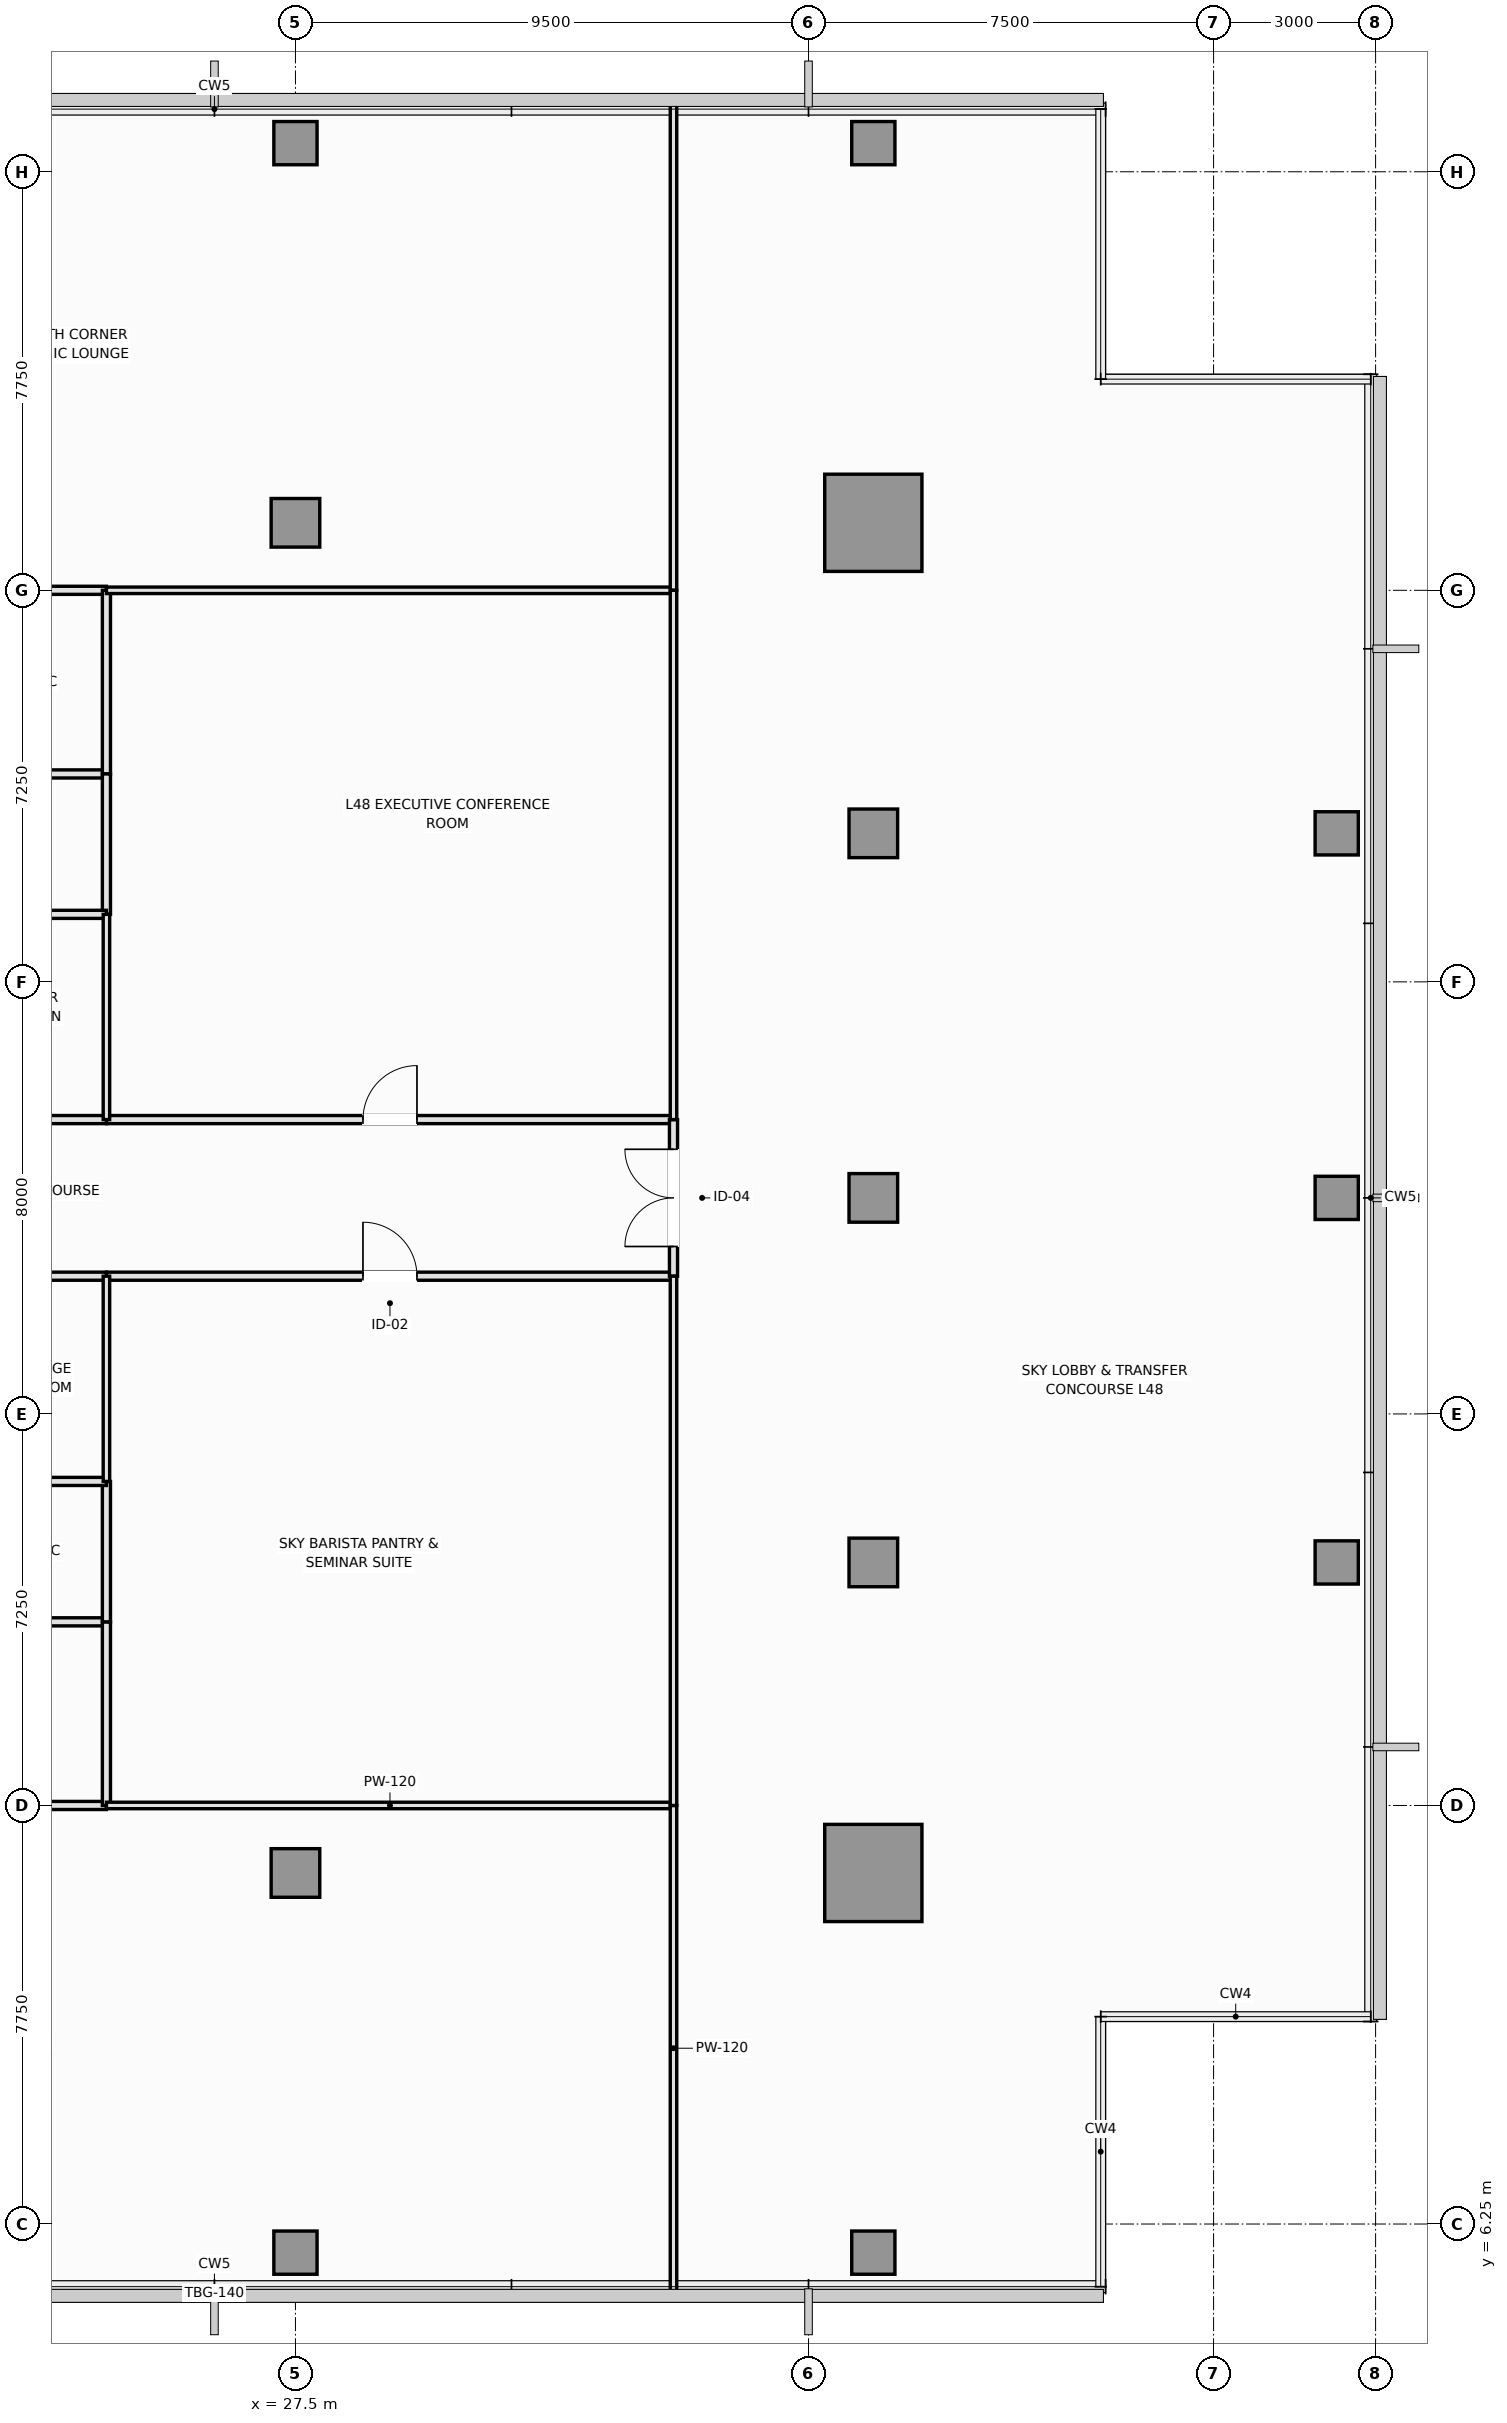
"""IFC4 building model, lengths in metres.
Left out: names, types, materials, properties, quantities, classifications, styles, units other than length and angle.
Written with IfcOpenShell. Run it as: python <this file> out.ifc"""

import sys

from ifc_helpers import new_model, si_unit, direction, frame, frame_2d, origin, origin_2d, place, context, subcontext, project, spatial, rectangle, extrude, element, fill, save


model = new_model("IFC4")
c1 = context("Model", 3, precision=1e-05, world=origin(), true_north=direction((0.0, 1.0)))
c2 = subcontext(c1, "Body", "Model", "MODEL_VIEW")
j1 = project(units=[si_unit("LENGTHUNIT", "METRE"), si_unit("PLANEANGLEUNIT", "RADIAN")], contexts=[c1])
p1 = place(None, origin())
s1 = spatial("IfcSite", under=j1, at=p1, CompositionType="ELEMENT")
p2 = place(p1, origin())
s2 = spatial("IfcBuilding", under=s1, at=p2, CompositionType="ELEMENT")
p3 = place(p2, frame((0.0, 0.0, 183.65)))
s3 = spatial("IfcBuildingStorey", under=s2, at=p3, CompositionType="ELEMENT", Elevation=183.65)
for number, where, z_axis, x_axis in (
    (1, (38.2, 12.75, 0.0), (0.0, 0.0, 1.0), (1.0, 0.0, 0.0)),
    (2, (38.2, 37.75, 0.0), (0.0, 0.0, 1.0), (1.0, 0.0, 0.0)),
):
    element("IfcColumn", number, at=place(p3, frame(where, z_axis=z_axis, x_axis=x_axis)), inside=s3, PredefinedType="COLUMN", context=c2, shape_type="SweptSolid", body=[
        extrude(rectangle(XDim=1.8, YDim=1.8, at=origin_2d()), origin(), (0.0, 0.0, 1.0), 4.4),
    ])
for number, where, z_axis, x_axis in (
    (3, (27.5, 12.75, 0.0), (0.0, 0.0, 1.0), (1.0, 0.0, 0.0)),
    (4, (27.5, 37.75, 0.0), (0.0, 0.0, 1.0), (1.0, 0.0, 0.0)),
    (5, (38.2, 18.5, 0.0), (0.0, 0.0, 1.0), (1.0, 0.0, 0.0)),
    (6, (38.2, 25.25, 0.0), (0.0, 0.0, 1.0), (1.0, 0.0, 0.0)),
    (7, (38.2, 32.0, 0.0), (0.0, 0.0, 1.0), (1.0, 0.0, 0.0)),
):
    element("IfcColumn", number, at=place(p3, frame(where, z_axis=z_axis, x_axis=x_axis)), inside=s3, PredefinedType="COLUMN", context=c2, shape_type="SweptSolid", body=[
        extrude(rectangle(XDim=0.9, YDim=0.9, at=origin_2d()), origin(), (0.0, 0.0, 1.0), 4.4),
    ])
for number, where, z_axis, x_axis in (
    (8, (46.78, 18.5, 0.0), (0.0, 0.0, 1.0), (1.0, 0.0, 0.0)),
    (9, (46.78, 25.25, 0.0), (0.0, 0.0, 1.0), (1.0, 0.0, 0.0)),
    (10, (46.78, 32.0, 0.0), (0.0, 0.0, 1.0), (1.0, 0.0, 0.0)),
    (11, (27.5, 5.72, 0.0), (0.0, 0.0, 1.0), (1.0, 0.0, 0.0)),
    (12, (38.2, 5.72, 0.0), (0.0, 0.0, 1.0), (1.0, 0.0, 0.0)),
    (13, (27.5, 44.78, 0.0), (0.0, 0.0, 1.0), (1.0, 0.0, 0.0)),
    (14, (38.2, 44.78, 0.0), (0.0, 0.0, 1.0), (1.0, 0.0, 0.0)),
):
    element("IfcColumn", number, at=place(p3, frame(where, z_axis=z_axis, x_axis=x_axis)), inside=s3, PredefinedType="COLUMN", context=c2, shape_type="SweptSolid", body=[
        extrude(rectangle(XDim=0.8, YDim=0.8, at=origin_2d()), origin(), (0.0, 0.0, 1.0), 4.4),
    ])
p4 = place(p3, frame((24.0, 23.8, 0.0), z_axis=(0.0, 0.0, 1.0), x_axis=(1.0, 0.0, 0.0)))
e15 = element("IfcWall", 15, at=p4, inside=s3, PredefinedType="PARTITIONING", context=c2, shape_type="SweptSolid", body=[
    extrude(rectangle(XDim=10.5, YDim=0.15, at=frame_2d((5.25, 0.0))), origin(), (0.0, 0.0, 1.0), 4.22),
])
p5 = place(p4, frame((4.75, 0.0, 0.0)))
e16 = element("IfcOpeningElement", 16, at=p5, cuts=e15, PredefinedType="OPENING", context=c2, shape_type="SweptSolid", body=[
    extrude(rectangle(XDim=1.0, YDim=2.15, at=frame_2d((0.5, 1.075))), frame((0.0, 0.085, 0.0), z_axis=(0.0, -1.0, 0.0), x_axis=(1.0, 0.0, 0.0)), (0.0, 0.0, 1.0), 0.17),
])
p6 = place(p3, frame((24.0, 26.7, 0.0), z_axis=(0.0, 0.0, 1.0), x_axis=(1.0, 0.0, 0.0)))
e17 = element("IfcWall", 17, at=p6, inside=s3, PredefinedType="PARTITIONING", context=c2, shape_type="SweptSolid", body=[
    extrude(rectangle(XDim=10.5, YDim=0.15, at=frame_2d((5.25, 0.0))), origin(), (0.0, 0.0, 1.0), 4.22),
])
p7 = place(p6, frame((4.75, 0.0, 0.0)))
e18 = element("IfcOpeningElement", 18, at=p7, cuts=e17, PredefinedType="OPENING", context=c2, shape_type="SweptSolid", body=[
    extrude(rectangle(XDim=1.0, YDim=2.15, at=frame_2d((0.5, 1.075))), frame((0.0, 0.085, 0.0), z_axis=(0.0, -1.0, 0.0), x_axis=(1.0, 0.0, 0.0)), (0.0, 0.0, 1.0), 0.17),
])
p8 = place(p3, frame((34.5, 23.8, 0.0), z_axis=(0.0, 0.0, 1.0), x_axis=(0.0, 1.0, 0.0)))
e19 = element("IfcWall", 19, at=p8, inside=s3, PredefinedType="PARTITIONING", context=c2, shape_type="SweptSolid", body=[
    extrude(rectangle(XDim=2.9, YDim=0.15, at=frame_2d((1.45, 0.0))), origin(), (0.0, 0.0, 1.0), 4.22),
])
p9 = place(p8, frame((0.55, 0.0, 0.0)))
e20 = element("IfcOpeningElement", 20, at=p9, cuts=e19, PredefinedType="OPENING", context=c2, shape_type="SweptSolid", body=[
    extrude(rectangle(XDim=1.8, YDim=2.2, at=frame_2d((0.9, 1.1))), frame((0.0, 0.085, 0.0), z_axis=(0.0, -1.0, 0.0), x_axis=(1.0, 0.0, 0.0)), (0.0, 0.0, 1.0), 0.17),
])
for number, where, z_axis, x_axis in (
    (21, (20.2, 23.8, 0.0), (0.0, 0.0, 1.0), (1.0, 0.0, 0.0)),
    (22, (20.2, 26.7, 0.0), (0.0, 0.0, 1.0), (1.0, 0.0, 0.0)),
):
    element("IfcWall", number, at=place(p3, frame(where, z_axis=z_axis, x_axis=x_axis)), inside=s3, PredefinedType="PARTITIONING", context=c2, shape_type="SweptSolid", body=[
        extrude(rectangle(XDim=3.8, YDim=0.15, at=frame_2d((1.9, 0.0))), origin(), (0.0, 0.0, 1.0), 4.22),
    ])
for number, where, z_axis, x_axis in (
    (23, (20.2, 17.4, 0.0), (0.0, 0.0, 1.0), (1.0, 0.0, 0.0)),
    (24, (20.2, 14.0, 0.0), (0.0, 0.0, 1.0), (1.0, 0.0, 0.0)),
):
    element("IfcWall", number, at=place(p3, frame(where, z_axis=z_axis, x_axis=x_axis)), inside=s3, PredefinedType="PLUMBINGWALL", context=c2, shape_type="SweptSolid", body=[
        extrude(rectangle(XDim=3.8, YDim=0.15, at=frame_2d((1.9, 0.0))), origin(), (0.0, 0.0, 1.0), 4.22),
    ])
p10 = place(p3, frame((24.0, 14.0, 0.0), z_axis=(0.0, 0.0, 1.0), x_axis=(0.0, 1.0, 0.0)))
e25 = element("IfcWall", 25, at=p10, inside=s3, PredefinedType="PLUMBINGWALL", context=c2, shape_type="SweptSolid", body=[
    extrude(rectangle(XDim=3.4, YDim=0.15, at=frame_2d((1.7, 0.0))), origin(), (0.0, 0.0, 1.0), 4.22),
])
for number, where, z_axis, x_axis in (
    (26, (20.2, 33.1, 0.0), (0.0, 0.0, 1.0), (1.0, 0.0, 0.0)),
    (27, (20.2, 36.5, 0.0), (0.0, 0.0, 1.0), (1.0, 0.0, 0.0)),
):
    element("IfcWall", number, at=place(p3, frame(where, z_axis=z_axis, x_axis=x_axis)), inside=s3, PredefinedType="PLUMBINGWALL", context=c2, shape_type="SweptSolid", body=[
        extrude(rectangle(XDim=3.8, YDim=0.15, at=frame_2d((1.9, 0.0))), origin(), (0.0, 0.0, 1.0), 4.22),
    ])
p11 = place(p3, frame((24.0, 33.1, 0.0), z_axis=(0.0, 0.0, 1.0), x_axis=(0.0, 1.0, 0.0)))
e28 = element("IfcWall", 28, at=p11, inside=s3, PredefinedType="PLUMBINGWALL", context=c2, shape_type="SweptSolid", body=[
    extrude(rectangle(XDim=3.4, YDim=0.15, at=frame_2d((1.7, 0.0))), origin(), (0.0, 0.0, 1.0), 4.22),
])
p12 = place(p3, frame((24.0, 17.4, 0.0), z_axis=(0.0, 0.0, 1.0), x_axis=(0.0, 1.0, 0.0)))
e29 = element("IfcWall", 29, at=p12, inside=s3, PredefinedType="PLUMBINGWALL", context=c2, shape_type="SweptSolid", body=[
    extrude(rectangle(XDim=2.6, YDim=0.15, at=frame_2d((1.3, 0.0))), origin(), (0.0, 0.0, 1.0), 4.22),
])
p13 = place(p3, frame((20.2, 20.0, 0.0), z_axis=(0.0, 0.0, 1.0), x_axis=(1.0, 0.0, 0.0)))
e30 = element("IfcWall", 30, at=p13, inside=s3, PredefinedType="PLUMBINGWALL", context=c2, shape_type="SweptSolid", body=[
    extrude(rectangle(XDim=3.8, YDim=0.15, at=frame_2d((1.9, 0.0))), origin(), (0.0, 0.0, 1.0), 4.22),
])
p14 = place(p3, frame((24.0, 30.5, 0.0), z_axis=(0.0, 0.0, 1.0), x_axis=(0.0, 1.0, 0.0)))
e31 = element("IfcWall", 31, at=p14, inside=s3, PredefinedType="PLUMBINGWALL", context=c2, shape_type="SweptSolid", body=[
    extrude(rectangle(XDim=2.6, YDim=0.15, at=frame_2d((1.3, 0.0))), origin(), (0.0, 0.0, 1.0), 4.22),
])
p15 = place(p3, frame((20.2, 30.5, 0.0), z_axis=(0.0, 0.0, 1.0), x_axis=(1.0, 0.0, 0.0)))
e32 = element("IfcWall", 32, at=p15, inside=s3, PredefinedType="PLUMBINGWALL", context=c2, shape_type="SweptSolid", body=[
    extrude(rectangle(XDim=3.8, YDim=0.15, at=frame_2d((1.9, 0.0))), origin(), (0.0, 0.0, 1.0), 4.22),
])
p16 = place(p3, frame((24.0, 14.0, 0.0), z_axis=(0.0, 0.0, 1.0), x_axis=(1.0, 0.0, 0.0)))
e33 = element("IfcWall", 33, at=p16, inside=s3, PredefinedType="PARTITIONING", context=c2, shape_type="SweptSolid", body=[
    extrude(rectangle(XDim=10.5, YDim=0.12, at=frame_2d((5.25, 0.0))), origin(), (0.0, 0.0, 1.0), 4.22),
])
p17 = place(p3, frame((34.5, 5.01, 0.0), z_axis=(0.0, 0.0, 1.0), x_axis=(0.0, 1.0, 0.0)))
e34 = element("IfcWall", 34, at=p17, inside=s3, PredefinedType="PARTITIONING", context=c2, shape_type="SweptSolid", body=[
    extrude(rectangle(XDim=8.99, YDim=0.12, at=frame_2d((4.495, 0.0))), origin(), (0.0, 0.0, 1.0), 3.86),
])
p18 = place(p3, frame((24.0, 36.5, 0.0), z_axis=(0.0, 0.0, 1.0), x_axis=(1.0, 0.0, 0.0)))
e35 = element("IfcWall", 35, at=p18, inside=s3, PredefinedType="PARTITIONING", context=c2, shape_type="SweptSolid", body=[
    extrude(rectangle(XDim=10.5, YDim=0.12, at=frame_2d((5.25, 0.0))), origin(), (0.0, 0.0, 1.0), 4.22),
])
p19 = place(p3, frame((34.5, 36.5, 0.0), z_axis=(0.0, 0.0, 1.0), x_axis=(0.0, 1.0, 0.0)))
e36 = element("IfcWall", 36, at=p19, inside=s3, PredefinedType="PARTITIONING", context=c2, shape_type="SweptSolid", body=[
    extrude(rectangle(XDim=8.99, YDim=0.12, at=frame_2d((4.495, 0.0))), origin(), (0.0, 0.0, 1.0), 3.86),
])
p20 = place(p3, frame((34.5, 14.0, 0.0), z_axis=(0.0, 0.0, 1.0), x_axis=(0.0, 1.0, 0.0)))
e37 = element("IfcWall", 37, at=p20, inside=s3, PredefinedType="PARTITIONING", context=c2, shape_type="SweptSolid", body=[
    extrude(rectangle(XDim=9.8, YDim=0.12, at=frame_2d((4.9, 0.0))), origin(), (0.0, 0.0, 1.0), 4.22),
])
p21 = place(p3, frame((24.0, 20.0, 0.0), z_axis=(0.0, 0.0, 1.0), x_axis=(0.0, 1.0, 0.0)))
e38 = element("IfcWall", 38, at=p21, inside=s3, PredefinedType="PARTITIONING", context=c2, shape_type="SweptSolid", body=[
    extrude(rectangle(XDim=3.8, YDim=0.12, at=frame_2d((1.9, 0.0))), origin(), (0.0, 0.0, 1.0), 4.22),
])
p22 = place(p3, frame((34.5, 26.7, 0.0), z_axis=(0.0, 0.0, 1.0), x_axis=(0.0, 1.0, 0.0)))
e39 = element("IfcWall", 39, at=p22, inside=s3, PredefinedType="PARTITIONING", context=c2, shape_type="SweptSolid", body=[
    extrude(rectangle(XDim=9.8, YDim=0.12, at=frame_2d((4.9, 0.0))), origin(), (0.0, 0.0, 1.0), 4.22),
])
p23 = place(p3, frame((24.0, 26.7, 0.0), z_axis=(0.0, 0.0, 1.0), x_axis=(0.0, 1.0, 0.0)))
e40 = element("IfcWall", 40, at=p23, inside=s3, PredefinedType="PARTITIONING", context=c2, shape_type="SweptSolid", body=[
    extrude(rectangle(XDim=3.8, YDim=0.12, at=frame_2d((1.9, 0.0))), origin(), (0.0, 0.0, 1.0), 4.22),
])
p24 = place(p5, origin())
e41 = element("IfcDoor", 41, at=p24, inside=s3, OperationType="SINGLE_SWING_LEFT", PredefinedType="DOOR", context=c2, shape_type="SweptSolid", body=[
    extrude(rectangle(XDim=1.0, YDim=2.15, at=frame_2d((0.5, 1.075))), frame((0.0, 0.025, 0.0), z_axis=(0.0, -1.0, 0.0), x_axis=(1.0, 0.0, 0.0)), (0.0, 0.0, 1.0), 0.05),
])
fill(e16, e41)
p25 = place(p7, origin())
e42 = element("IfcDoor", 42, at=p25, inside=s3, OperationType="SINGLE_SWING_RIGHT", PredefinedType="DOOR", context=c2, shape_type="SweptSolid", body=[
    extrude(rectangle(XDim=1.0, YDim=2.15, at=frame_2d((0.5, 1.075))), frame((0.0, 0.025, 0.0), z_axis=(0.0, -1.0, 0.0), x_axis=(1.0, 0.0, 0.0)), (0.0, 0.0, 1.0), 0.05),
])
fill(e18, e42)
p26 = place(p9, origin())
e43 = element("IfcDoor", 43, at=p26, inside=s3, OperationType="DOUBLE_DOOR_SINGLE_SWING", PredefinedType="DOOR", context=c2, shape_type="SweptSolid", body=[
    extrude(rectangle(XDim=1.8, YDim=2.2, at=frame_2d((0.9, 1.1))), frame((0.0, 0.025, 0.0), z_axis=(0.0, -1.0, 0.0), x_axis=(1.0, 0.0, 0.0)), (0.0, 0.0, 1.0), 0.05),
])
fill(e20, e43)
save(model, sys.argv[1])
